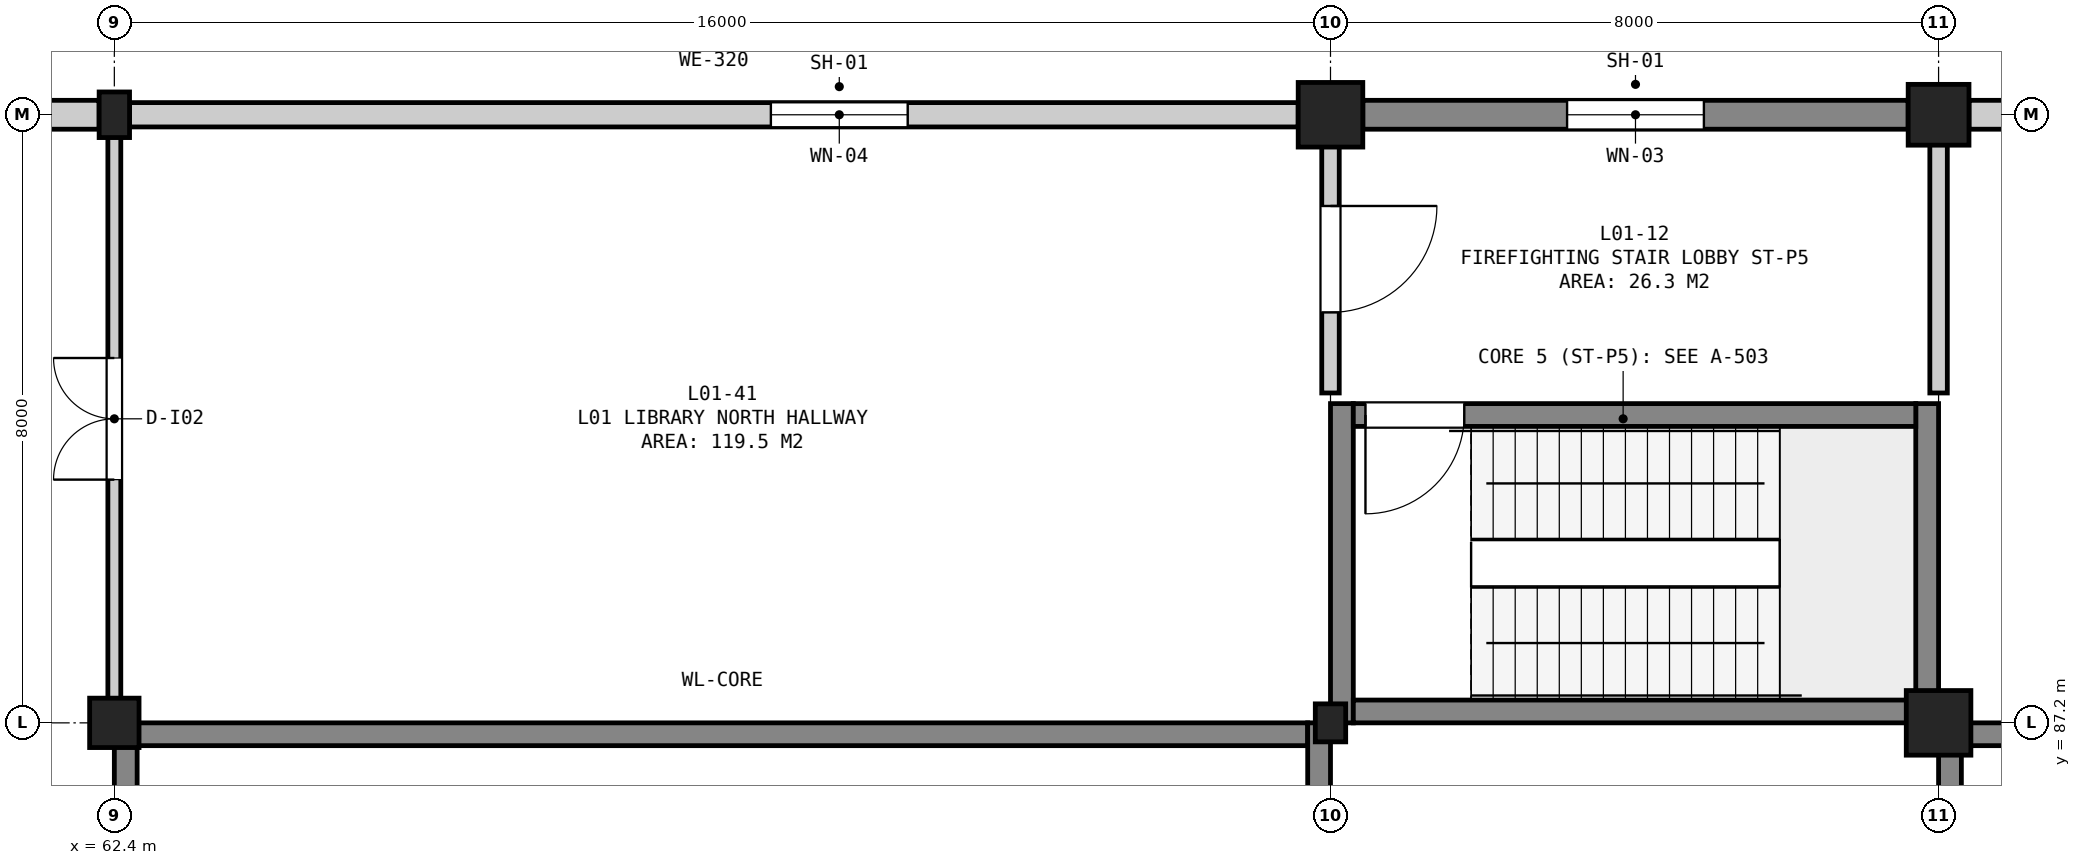
"""IFC4 building model, lengths in metres.
Left out: names, types, materials, properties, quantities, classifications, styles, units other than length and angle.
Written with IfcOpenShell. Run it as: python <this file> out.ifc"""

import sys

from ifc_helpers import new_model, si_unit, direction, frame, frame_2d, origin, origin_2d, place, context, subcontext, project, spatial, rectangle, extrude, element, fill, save


model = new_model("IFC4")
c1 = context("Model", 3, precision=1e-05, world=origin(), true_north=direction((0.0, 1.0)))
c2 = subcontext(c1, "Body", "Model", "MODEL_VIEW")
j1 = project(units=[si_unit("LENGTHUNIT", "METRE"), si_unit("PLANEANGLEUNIT", "RADIAN")], contexts=[c1])
p1 = place(None, origin())
s1 = spatial("IfcSite", under=j1, at=p1, CompositionType="ELEMENT")
p2 = place(p1, origin())
s2 = spatial("IfcBuilding", under=s1, at=p2, CompositionType="ELEMENT")
p3 = place(p2, frame((0.0, 0.0, 5.4)))
s3 = spatial("IfcBuildingStorey", under=s2, at=p3, CompositionType="ELEMENT", Elevation=5.4)
p4 = place(p3, frame((62.4, 87.2, 0.0), z_axis=(0.0, 0.0, 1.0), x_axis=(1.0, 0.0, 0.0)))
e1 = element("IfcColumn", 1, at=p4, inside=s3, PredefinedType="COLUMN", context=c2, shape_type="SweptSolid", body=[
    extrude(rectangle(XDim=0.65, YDim=0.65, at=origin_2d()), origin(), (0.0, 0.0, 1.0), 5.4),
])
p5 = place(p3, frame((62.4, 95.2, 0.0), z_axis=(0.0, 0.0, 1.0), x_axis=(1.0, 0.0, 0.0)))
e2 = element("IfcColumn", 2, at=p5, inside=s3, PredefinedType="COLUMN", context=c2, shape_type="SweptSolid", body=[
    extrude(rectangle(XDim=0.4, YDim=0.6, at=origin_2d()), origin(), (0.0, 0.0, 1.0), 5.4),
])
p6 = place(p3, frame((78.4, 87.2, 0.0), z_axis=(0.0, 0.0, 1.0), x_axis=(1.0, 0.0, 0.0)))
e3 = element("IfcColumn", 3, at=p6, inside=s3, PredefinedType="COLUMN", context=c2, shape_type="SweptSolid", body=[
    extrude(rectangle(XDim=0.4, YDim=0.5, at=origin_2d()), origin(), (0.0, 0.0, 1.0), 5.4),
])
for number, where, z_axis, x_axis in (
    (4, (78.4, 95.2, 0.0), (0.0, 0.0, 1.0), (1.0, 0.0, 0.0)),
    (5, (86.4, 87.2, 0.0), (0.0, 0.0, 1.0), (1.0, 0.0, 0.0)),
):
    element("IfcColumn", number, at=place(p3, frame(where, z_axis=z_axis, x_axis=x_axis)), inside=s3, PredefinedType="COLUMN", context=c2, shape_type="SweptSolid", body=[
        extrude(rectangle(XDim=0.85, YDim=0.85, at=origin_2d()), origin(), (0.0, 0.0, 1.0), 5.4),
    ])
p7 = place(p3, frame((86.4, 95.2, 0.0), z_axis=(0.0, 0.0, 1.0), x_axis=(1.0, 0.0, 0.0)))
e6 = element("IfcColumn", 6, at=p7, inside=s3, PredefinedType="COLUMN", context=c2, shape_type="SweptSolid", body=[
    extrude(rectangle(XDim=0.8, YDim=0.8, at=origin_2d()), origin(), (0.0, 0.0, 1.0), 5.4),
])
p8 = place(p3, frame((102.075, 95.2, 0.0), z_axis=(0.0, 0.0, 1.0), x_axis=(-1.0, 0.0, 0.0)))
e7 = element("IfcWall", 7, at=p8, inside=s3, PredefinedType="SOLIDWALL", context=c2, shape_type="SweptSolid", body=[
    extrude(rectangle(XDim=15.275, YDim=0.38, at=frame_2d((7.637, 0.0))), origin(), (0.0, 0.0, 1.0), 4.025),
])
p9 = place(p8, frame((4.938, 0.0, 0.9)))
e8 = element("IfcOpeningElement", 8, at=p9, cuts=e7, PredefinedType="OPENING", context=c2, shape_type="SweptSolid", body=[
    extrude(rectangle(XDim=2.1, YDim=2.1, at=frame_2d((1.05, 1.05))), frame((0.0, 0.202, 0.0), z_axis=(0.0, -1.0, 0.0), x_axis=(1.0, 0.0, 0.0)), (0.0, 0.0, 1.0), 0.404),
])
p10 = place(p3, frame((86.0, 95.2, 0.0), z_axis=(0.0, 0.0, 1.0), x_axis=(-1.0, 0.0, 0.0)))
e9 = element("IfcWall", 9, at=p10, inside=s3, PredefinedType="SOLIDWALL", context=c2, shape_type="SweptSolid", body=[
    extrude(rectangle(XDim=7.175, YDim=0.38, at=frame_2d((3.587, 0.0))), origin(), (0.0, 0.0, 1.0), 4.455),
])
p11 = place(p10, frame((2.688, 0.0, 0.9)))
e10 = element("IfcOpeningElement", 10, at=p11, cuts=e9, PredefinedType="OPENING", context=c2, shape_type="SweptSolid", body=[
    extrude(rectangle(XDim=1.8, YDim=2.1, at=frame_2d((0.9, 1.05))), frame((0.0, 0.202, 0.0), z_axis=(0.0, -1.0, 0.0), x_axis=(1.0, 0.0, 0.0)), (0.0, 0.0, 1.0), 0.404),
])
p12 = place(p3, frame((77.975, 95.2, 0.0), z_axis=(0.0, 0.0, 1.0), x_axis=(-1.0, 0.0, 0.0)))
e11 = element("IfcWall", 11, at=p12, inside=s3, PredefinedType="SOLIDWALL", context=c2, shape_type="SweptSolid", body=[
    extrude(rectangle(XDim=15.375, YDim=0.32, at=frame_2d((7.688, 0.0))), origin(), (0.0, 0.0, 1.0), 3.975),
])
p13 = place(p12, frame((5.137, 0.0, 0.9)))
e12 = element("IfcOpeningElement", 12, at=p13, cuts=e11, PredefinedType="OPENING", context=c2, shape_type="SweptSolid", body=[
    extrude(rectangle(XDim=1.8, YDim=1.85, at=frame_2d((0.9, 0.925))), frame((0.0, 0.172, 0.0), z_axis=(0.0, -1.0, 0.0), x_axis=(1.0, 0.0, 0.0)), (0.0, 0.0, 1.0), 0.344),
])
p14 = place(p3, frame((62.2, 95.2, 0.0), z_axis=(0.0, 0.0, 1.0), x_axis=(-1.0, 0.0, 0.0)))
e13 = element("IfcWall", 13, at=p14, inside=s3, PredefinedType="SOLIDWALL", context=c2, shape_type="SweptSolid", body=[
    extrude(rectangle(XDim=7.475, YDim=0.38, at=frame_2d((3.737, 0.0))), origin(), (0.0, 0.0, 1.0), 4.425),
])
p15 = place(p14, frame((2.938, 0.0, 0.9)))
e14 = element("IfcOpeningElement", 14, at=p15, cuts=e13, PredefinedType="OPENING", context=c2, shape_type="SweptSolid", body=[
    extrude(rectangle(XDim=1.6, YDim=1.95, at=frame_2d((0.8, 0.975))), frame((0.0, 0.202, 0.0), z_axis=(0.0, -1.0, 0.0), x_axis=(1.0, 0.0, 0.0)), (0.0, 0.0, 1.0), 0.404),
])
p16 = place(p3, frame((62.7, 87.05, 0.0), z_axis=(0.0, 0.0, 1.0), x_axis=(1.0, 0.0, 0.0)))
e15 = element("IfcWall", 15, at=p16, inside=s3, PredefinedType="SHEAR", context=c2, shape_type="SweptSolid", body=[
    extrude(rectangle(XDim=15.4, YDim=0.3, at=frame_2d((7.7, 0.0))), origin(), (0.0, 0.0, 1.0), 5.1),
])
for number, where, z_axis, x_axis in (
    (16, (62.55, 72.0, 0.0), (0.0, 0.0, 1.0), (0.0, 1.0, 0.0)),
    (17, (78.25, 72.0, 0.0), (0.0, 0.0, 1.0), (0.0, 1.0, 0.0)),
):
    element("IfcWall", number, at=place(p3, frame(where, z_axis=z_axis, x_axis=x_axis)), inside=s3, PredefinedType="SHEAR", context=c2, shape_type="SweptSolid", body=[
        extrude(rectangle(XDim=15.2, YDim=0.3, at=frame_2d((7.6, 0.0))), origin(), (0.0, 0.0, 1.0), 5.1),
    ])
p17 = place(p3, frame((86.7, 87.05, 0.0), z_axis=(0.0, 0.0, 1.0), x_axis=(1.0, 0.0, 0.0)))
e18 = element("IfcWall", 18, at=p17, inside=s3, PredefinedType="SHEAR", context=c2, shape_type="SweptSolid", body=[
    extrude(rectangle(XDim=15.4, YDim=0.3, at=frame_2d((7.7, 0.0))), origin(), (0.0, 0.0, 1.0), 5.1),
])
p18 = place(p3, frame((86.55, 72.0, 0.0), z_axis=(0.0, 0.0, 1.0), x_axis=(0.0, 1.0, 0.0)))
e19 = element("IfcWall", 19, at=p18, inside=s3, PredefinedType="SHEAR", context=c2, shape_type="SweptSolid", body=[
    extrude(rectangle(XDim=15.2, YDim=0.3, at=frame_2d((7.6, 0.0))), origin(), (0.0, 0.0, 1.0), 5.1),
])
for number, where, z_axis, x_axis in (
    (20, (78.55, 87.2, 0.0), (0.0, 0.0, 1.0), (0.0, 1.0, 0.0)),
    (21, (86.25, 87.2, 0.0), (0.0, 0.0, 1.0), (0.0, 1.0, 0.0)),
):
    element("IfcWall", number, at=place(p3, frame(where, z_axis=z_axis, x_axis=x_axis)), inside=s3, PredefinedType="SHEAR", context=c2, shape_type="SweptSolid", body=[
        extrude(rectangle(XDim=4.2, YDim=0.3, at=frame_2d((2.1, 0.0))), origin(), (0.0, 0.0, 1.0), 5.1),
    ])
p19 = place(p3, frame((78.7, 87.35, 0.0), z_axis=(0.0, 0.0, 1.0), x_axis=(1.0, 0.0, 0.0)))
e22 = element("IfcWall", 22, at=p19, inside=s3, PredefinedType="SHEAR", context=c2, shape_type="SweptSolid", body=[
    extrude(rectangle(XDim=7.4, YDim=0.3, at=frame_2d((3.7, 0.0))), origin(), (0.0, 0.0, 1.0), 5.1),
])
p20 = place(p3, frame((78.7, 91.25, 0.0), z_axis=(0.0, 0.0, 1.0), x_axis=(1.0, 0.0, 0.0)))
e23 = element("IfcWall", 23, at=p20, inside=s3, PredefinedType="SHEAR", context=c2, shape_type="SweptSolid", body=[
    extrude(rectangle(XDim=7.4, YDim=0.3, at=frame_2d((3.7, 0.0))), origin(), (0.0, 0.0, 1.0), 5.1),
])
p21 = place(p20, frame((0.16, 0.0, 0.0)))
e24 = element("IfcOpeningElement", 24, at=p21, cuts=e23, PredefinedType="OPENING", context=c2, shape_type="SweptSolid", body=[
    extrude(rectangle(XDim=1.3, YDim=2.18, at=frame_2d((0.65, 1.09))), frame((0.0, 0.162, 0.0), z_axis=(0.0, -1.0, 0.0), x_axis=(1.0, 0.0, 0.0)), (0.0, 0.0, 1.0), 0.324),
])
p22 = place(p3, frame((78.4, 91.54, 0.0), z_axis=(0.0, 0.0, 1.0), x_axis=(0.0, 1.0, 0.0)))
e25 = element("IfcWall", 25, at=p22, inside=s3, PredefinedType="SOLIDWALL", context=c2, shape_type="SweptSolid", body=[
    extrude(rectangle(XDim=3.555, YDim=0.23, at=frame_2d((1.777, 0.0))), origin(), (0.0, 0.0, 1.0), 4.535),
])
p23 = place(p22, frame((1.06, 0.0, 0.0)))
e26 = element("IfcOpeningElement", 26, at=p23, cuts=e25, PredefinedType="OPENING", context=c2, shape_type="SweptSolid", body=[
    extrude(rectangle(XDim=1.4, YDim=2.2, at=frame_2d((0.7, 1.1))), frame((0.0, 0.127, 0.0), z_axis=(0.0, -1.0, 0.0), x_axis=(1.0, 0.0, 0.0)), (0.0, 0.0, 1.0), 0.254),
])
p24 = place(p3, frame((86.4, 91.54, 0.0), z_axis=(0.0, 0.0, 1.0), x_axis=(0.0, 1.0, 0.0)))
e27 = element("IfcWall", 27, at=p24, inside=s3, PredefinedType="SOLIDWALL", context=c2, shape_type="SweptSolid", body=[
    extrude(rectangle(XDim=3.555, YDim=0.23, at=frame_2d((1.777, 0.0))), origin(), (0.0, 0.0, 1.0), 4.435),
])
p25 = place(p3, frame((62.4, 87.34, 0.0), z_axis=(0.0, 0.0, 1.0), x_axis=(0.0, 1.0, 0.0)))
e28 = element("IfcWall", 28, at=p25, inside=s3, PredefinedType="PARTITIONING", context=c2, shape_type="SweptSolid", body=[
    extrude(rectangle(XDim=7.655, YDim=0.17, at=frame_2d((3.828, 0.0))), origin(), (0.0, 0.0, 1.0), 4.285),
])
p26 = place(p25, frame((3.06, 0.0, 0.0)))
e29 = element("IfcOpeningElement", 29, at=p26, cuts=e28, PredefinedType="OPENING", context=c2, shape_type="SweptSolid", body=[
    extrude(rectangle(XDim=1.6, YDim=2.2, at=frame_2d((0.8, 1.1))), frame((0.0, 0.097, 0.0), z_axis=(0.0, -1.0, 0.0), x_axis=(1.0, 0.0, 0.0)), (0.0, 0.0, 1.0), 0.194),
])
p27 = place(p11, origin())
e30 = element("IfcWindow", 30, at=p27, inside=s3, PartitioningType="DOUBLE_PANEL_VERTICAL", PredefinedType="WINDOW", context=c2, shape_type="SweptSolid", body=[
    extrude(rectangle(XDim=1.8, YDim=2.1, at=frame_2d((0.9, 1.05))), frame((0.0, 0.03, 0.0), z_axis=(0.0, -1.0, 0.0), x_axis=(1.0, 0.0, 0.0)), (0.0, 0.0, 1.0), 0.06),
])
fill(e10, e30)
p28 = place(p13, origin())
e31 = element("IfcWindow", 31, at=p28, inside=s3, PartitioningType="DOUBLE_PANEL_VERTICAL", PredefinedType="WINDOW", context=c2, shape_type="SweptSolid", body=[
    extrude(rectangle(XDim=1.8, YDim=1.85, at=frame_2d((0.9, 0.925))), frame((0.0, 0.03, 0.0), z_axis=(0.0, -1.0, 0.0), x_axis=(1.0, 0.0, 0.0)), (0.0, 0.0, 1.0), 0.06),
])
fill(e12, e31)
p29 = place(p21, frame((1.3, 0.0, 0.0), z_axis=(0.0, 0.0, 1.0), x_axis=(-1.0, 0.0, 0.0)))
e32 = element("IfcDoor", 32, at=p29, inside=s3, OperationType="SINGLE_SWING_RIGHT", PredefinedType="DOOR", context=c2, shape_type="SweptSolid", body=[
    extrude(rectangle(XDim=1.3, YDim=2.18, at=frame_2d((0.65, 1.09))), frame((0.0, 0.025, 0.0), z_axis=(0.0, -1.0, 0.0), x_axis=(1.0, 0.0, 0.0)), (0.0, 0.0, 1.0), 0.05),
])
fill(e24, e32)
p30 = place(p23, frame((1.4, 0.0, 0.0), z_axis=(0.0, 0.0, 1.0), x_axis=(-1.0, 0.0, 0.0)))
e33 = element("IfcDoor", 33, at=p30, inside=s3, OperationType="SINGLE_SWING_LEFT", PredefinedType="DOOR", context=c2, shape_type="SweptSolid", body=[
    extrude(rectangle(XDim=1.4, YDim=2.2, at=frame_2d((0.7, 1.1))), frame((0.0, 0.025, 0.0), z_axis=(0.0, -1.0, 0.0), x_axis=(1.0, 0.0, 0.0)), (0.0, 0.0, 1.0), 0.05),
])
fill(e26, e33)
p31 = place(p26, origin())
e34 = element("IfcDoor", 34, at=p31, inside=s3, OperationType="DOUBLE_DOOR_SINGLE_SWING", PredefinedType="DOOR", context=c2, shape_type="SweptSolid", body=[
    extrude(rectangle(XDim=1.6, YDim=2.2, at=frame_2d((0.8, 1.1))), frame((0.0, 0.025, 0.0), z_axis=(0.0, -1.0, 0.0), x_axis=(1.0, 0.0, 0.0)), (0.0, 0.0, 1.0), 0.05),
])
fill(e29, e34)
save(model, sys.argv[1])
